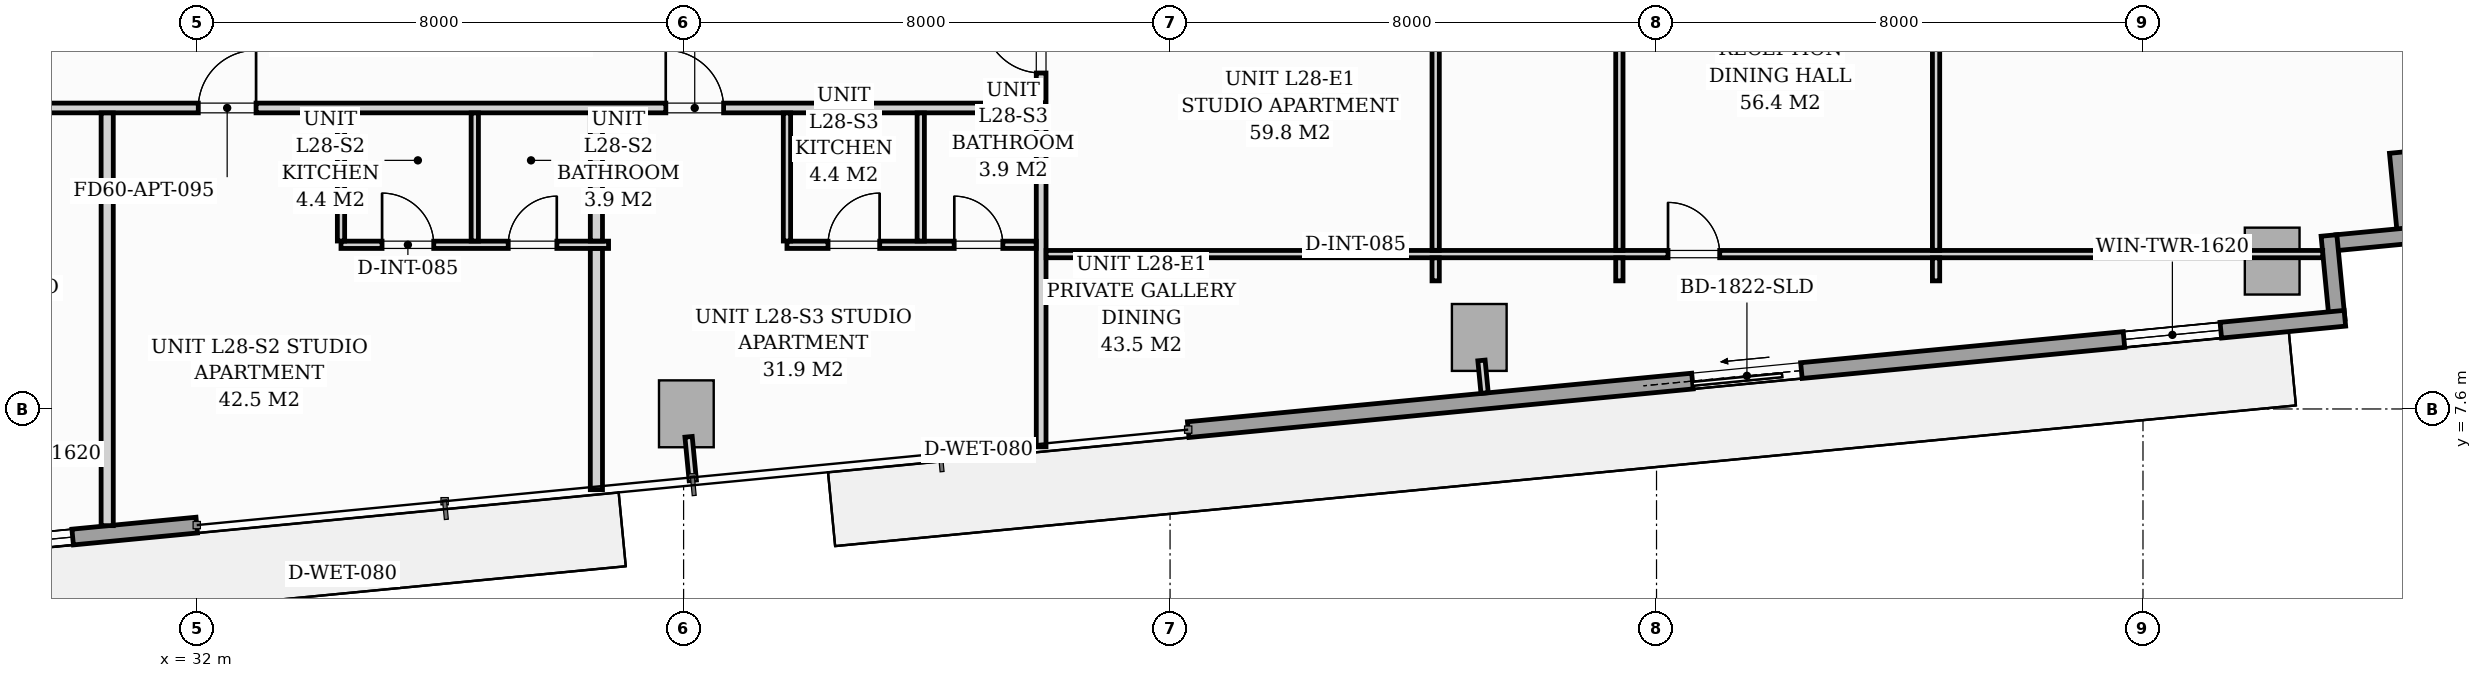
"""IFC4 building model, lengths in metres.
Left out: names, types, materials, properties, quantities, classifications, styles, units other than length and angle.
Written with IfcOpenShell. Run it as: python <this file> out.ifc"""

import sys

from ifc_helpers import new_model, si_unit, direction, frame, frame_2d, origin, origin_2d, place, context, subcontext, project, spatial, rectangle, extrude, source, transform, mapped, element, fill, save


model = new_model("IFC4")
c1 = context("Model", 3, precision=1e-05, world=origin(), true_north=direction((0.0, 1.0)))
c2 = subcontext(c1, "Body", "Model", "MODEL_VIEW")
j1 = project(units=[si_unit("LENGTHUNIT", "METRE"), si_unit("PLANEANGLEUNIT", "RADIAN")], contexts=[c1])
p1 = place(None, origin())
s1 = spatial("IfcSite", under=j1, at=p1, CompositionType="ELEMENT")
p2 = place(p1, origin())
s2 = spatial("IfcBuilding", under=s1, at=p2, CompositionType="ELEMENT")
p3 = place(p2, frame((0.0, 0.0, 100.2)))
s3 = spatial("IfcBuildingStorey", under=s2, at=p3, CompositionType="ELEMENT", Elevation=100.2)
m1 = source(origin(), c2, "Body", "SweptSolid", [
    extrude(rectangle(XDim=0.9, YDim=1.1, at=origin_2d()), origin(), (0.0, 0.0, 1.0), 3.196),
])
for number, where, z_axis, x_axis in (
    (1, (40.045, 7.521, 0.002), (0.0, 0.0, 1.0), (0.995, 0.096, 0.0)),
    (2, (53.085, 8.776, 0.002), (0.0, 0.0, 1.0), (0.995, 0.096, 0.0)),
    (3, (66.125, 10.032, 0.002), (0.0, 0.0, 1.0), (0.995, 0.096, 0.0)),
):
    element("IfcColumn", number, at=place(p3, frame(where, z_axis=z_axis, x_axis=x_axis)), inside=s3, PredefinedType="COLUMN", context=c2, shape_type="MappedRepresentation", body=[
        mapped(m1, transform((0.0, 0.0, 0.0), scale=1.0)),
    ])
p4 = place(p3, frame((68.183, 11.817, 0.0), z_axis=(0.0, 0.0, 1.0), x_axis=(0.095915846097, -0.995389446633, 0.0)))
e4 = element("IfcWall", 4, at=p4, inside=s3, PredefinedType="STANDARD", context=c2, shape_type="SweptSolid", body=[
    extrude(rectangle(XDim=1.395, YDim=0.26, at=frame_2d((0.697, 0.0))), origin(), (0.0, 0.0, 1.0), 2.94),
])
p5 = place(p3, frame((68.574, 10.469, 0.0), z_axis=(0.0, 0.0, 1.0), x_axis=(-0.99540774648, -0.095725744959, 0.0)))
e5 = element("IfcWall", 5, at=p5, inside=s3, PredefinedType="STANDARD", context=c2, shape_type="SweptSolid", body=[
    extrude(rectangle(XDim=1.395, YDim=0.26, at=frame_2d((0.698, 0.0))), origin(), (0.0, 0.0, 1.0), 2.94),
])
p6 = place(p3, frame((67.059, 10.453, 0.0), z_axis=(0.0, 0.0, 1.0), x_axis=(0.095915846097, -0.995389446633, 0.0)))
e6 = element("IfcWall", 6, at=p6, inside=s3, PredefinedType="STANDARD", context=c2, shape_type="SweptSolid", body=[
    extrude(rectangle(XDim=1.395, YDim=0.26, at=frame_2d((0.697, 0.0))), origin(), (0.0, 0.0, 1.0), 2.94),
])
p7 = place(p3, frame((67.32, 9.092, 0.0), z_axis=(0.0, 0.0, 1.0), x_axis=(-0.995396521236, -0.095842399342, 0.0)))
e7 = element("IfcWall", 7, at=p7, inside=s3, PredefinedType="STANDARD", context=c2, shape_type="SweptSolid", body=[
    extrude(rectangle(XDim=19.11, YDim=0.26, at=frame_2d((9.555, 0.0))), origin(), (0.0, 0.0, 1.0), 2.94),
])
p8 = place(p7, frame((8.979, 0.0, 0.0)))
e8 = element("IfcOpeningElement", 8, at=p8, cuts=e7, PredefinedType="OPENING", context=c2, shape_type="SweptSolid", body=[
    extrude(rectangle(XDim=1.8, YDim=2.06, at=frame_2d((0.9, 1.03))), frame((0.0, 0.14, 0.0), z_axis=(0.0, -1.0, 0.0), x_axis=(1.0, 0.0, 0.0)), (0.0, 0.0, 1.0), 0.28),
])
p9 = place(p7, frame((2.05, 0.0, 0.65)))
e9 = element("IfcOpeningElement", 9, at=p9, cuts=e7, PredefinedType="OPENING", context=c2, shape_type="SweptSolid", body=[
    extrude(rectangle(XDim=1.6, YDim=1.5, at=frame_2d((0.8, 0.75))), frame((0.0, 0.14, 0.0), z_axis=(0.0, -1.0, 0.0), x_axis=(1.0, 0.0, 0.0)), (0.0, 0.0, 1.0), 0.28),
])
p10 = place(p3, frame((31.994, 5.69, 0.0), z_axis=(0.0, 0.0, 1.0), x_axis=(-0.995396521236, -0.095842399342, 0.0)))
e10 = element("IfcWall", 10, at=p10, inside=s3, PredefinedType="STANDARD", context=c2, shape_type="SweptSolid", body=[
    extrude(rectangle(XDim=19.11, YDim=0.26, at=frame_2d((9.555, 0.0))), origin(), (0.0, 0.0, 1.0), 2.94),
])
p11 = place(p10, frame((8.19, 0.0, 0.0)))
e11 = element("IfcOpeningElement", 11, at=p11, cuts=e10, PredefinedType="OPENING", context=c2, shape_type="SweptSolid", body=[
    extrude(rectangle(XDim=1.8, YDim=2.06, at=frame_2d((0.9, 1.03))), frame((0.0, 0.14, 0.0), z_axis=(0.0, -1.0, 0.0), x_axis=(1.0, 0.0, 0.0)), (0.0, 0.0, 1.0), 0.28),
])
p12 = place(p10, frame((2.05, 0.0, 0.65)))
e12 = element("IfcOpeningElement", 12, at=p12, cuts=e10, PredefinedType="OPENING", context=c2, shape_type="SweptSolid", body=[
    extrude(rectangle(XDim=1.6, YDim=1.5, at=frame_2d((0.8, 0.75))), frame((0.0, 0.14, 0.0), z_axis=(0.0, -1.0, 0.0), x_axis=(1.0, 0.0, 0.0)), (0.0, 0.0, 1.0), 0.28),
])
p13 = place(p3, frame((21.5, 12.55, 0.0), z_axis=(0.0, 0.0, 1.0), x_axis=(1.0, 0.0, 0.0)))
e13 = element("IfcWall", 13, at=p13, inside=s3, PredefinedType="PARTITIONING", context=c2, shape_type="SweptSolid", body=[
    extrude(rectangle(XDim=24.38, YDim=0.16, at=frame_2d((12.19, 0.0))), origin(), (0.0, 0.0, 1.0), 2.94),
])
p14 = place(p13, frame((6.075, 0.0, 0.0)))
e14 = element("IfcOpeningElement", 14, at=p14, cuts=e13, PredefinedType="OPENING", context=c2, shape_type="SweptSolid", body=[
    extrude(rectangle(XDim=0.95, YDim=2.06, at=frame_2d((0.475, 1.03))), frame((0.0, 0.09, 0.0), z_axis=(0.0, -1.0, 0.0), x_axis=(1.0, 0.0, 0.0)), (0.0, 0.0, 1.0), 0.18),
])
p15 = place(p13, frame((10.519, 0.0, 0.0)))
e15 = element("IfcOpeningElement", 15, at=p15, cuts=e13, PredefinedType="OPENING", context=c2, shape_type="SweptSolid", body=[
    extrude(rectangle(XDim=0.95, YDim=2.06, at=frame_2d((0.475, 1.03))), frame((0.0, 0.09, 0.0), z_axis=(0.0, -1.0, 0.0), x_axis=(1.0, 0.0, 0.0)), (0.0, 0.0, 1.0), 0.18),
])
p16 = place(p13, frame((18.208, 0.0, 0.0)))
e16 = element("IfcOpeningElement", 16, at=p16, cuts=e13, PredefinedType="OPENING", context=c2, shape_type="SweptSolid", body=[
    extrude(rectangle(XDim=0.95, YDim=2.06, at=frame_2d((0.475, 1.03))), frame((0.0, 0.09, 0.0), z_axis=(0.0, -1.0, 0.0), x_axis=(1.0, 0.0, 0.0)), (0.0, 0.0, 1.0), 0.18),
])
p17 = place(p3, frame((45.88, 6.977, 0.0), z_axis=(0.0, 0.0, 1.0), x_axis=(0.0, 1.0, 0.0)))
e17 = element("IfcWall", 17, at=p17, inside=s3, PredefinedType="PARTITIONING", context=c2, shape_type="SweptSolid", body=[
    extrude(rectangle(XDim=5.491, YDim=0.16, at=frame_2d((2.745, 0.0))), origin(), (0.0, 0.0, 1.0), 2.94),
])
p18 = place(p3, frame((45.88, 12.632, 0.0), z_axis=(0.0, 0.0, 1.0), x_axis=(0.0, 1.0, 0.0)))
e18 = element("IfcWall", 18, at=p18, inside=s3, PredefinedType="PARTITIONING", context=c2, shape_type="SweptSolid", body=[
    extrude(rectangle(XDim=4.466, YDim=0.16, at=frame_2d((2.233, 0.0))), origin(), (0.0, 0.0, 1.0), 2.94),
])
p19 = place(p18, frame((0.493, 0.0, 0.0)))
e19 = element("IfcOpeningElement", 19, at=p19, cuts=e18, PredefinedType="OPENING", context=c2, shape_type="SweptSolid", body=[
    extrude(rectangle(XDim=0.95, YDim=2.06, at=frame_2d((0.475, 1.03))), frame((0.0, 0.09, 0.0), z_axis=(0.0, -1.0, 0.0), x_axis=(1.0, 0.0, 0.0)), (0.0, 0.0, 1.0), 0.18),
])
p20 = place(p3, frame((30.521, 5.681, 0.0), z_axis=(0.0, 0.0, 1.0), x_axis=(0.0, 1.0, 0.0)))
e20 = element("IfcWall", 20, at=p20, inside=s3, PredefinedType="PARTITIONING", context=c2, shape_type="SweptSolid", body=[
    extrude(rectangle(XDim=6.787, YDim=0.2, at=frame_2d((3.394, 0.0))), origin(), (0.0, 0.0, 1.0), 2.94),
])
p21 = place(p3, frame((34.366, 10.3, 0.0), z_axis=(0.0, 0.0, 1.0), x_axis=(1.0, 0.0, 0.0)))
e21 = element("IfcWall", 21, at=p21, inside=s3, PredefinedType="PARTITIONING", context=c2, shape_type="SweptSolid", body=[
    extrude(rectangle(XDim=4.4, YDim=0.12, at=frame_2d((2.2, 0.0))), origin(), (0.0, 0.0, 1.0), 2.94),
])
p22 = place(p21, frame((0.675, 0.0, 0.0)))
e22 = element("IfcOpeningElement", 22, at=p22, cuts=e21, PredefinedType="OPENING", context=c2, shape_type="SweptSolid", body=[
    extrude(rectangle(XDim=0.85, YDim=2.05, at=frame_2d((0.425, 1.025))), frame((0.0, 0.07, 0.0), z_axis=(0.0, -1.0, 0.0), x_axis=(1.0, 0.0, 0.0)), (0.0, 0.0, 1.0), 0.14),
])
p23 = place(p21, frame((2.75, 0.0, 0.0)))
e23 = element("IfcOpeningElement", 23, at=p23, cuts=e21, PredefinedType="OPENING", context=c2, shape_type="SweptSolid", body=[
    extrude(rectangle(XDim=0.8, YDim=2.02, at=frame_2d((0.4, 1.01))), frame((0.0, 0.07, 0.0), z_axis=(0.0, -1.0, 0.0), x_axis=(1.0, 0.0, 0.0)), (0.0, 0.0, 1.0), 0.14),
])
for number, where, z_axis, x_axis in (
    (24, (34.366, 10.362, 0.0), (0.0, 0.0, 1.0), (0.0, 1.0, 0.0)),
    (25, (36.566, 10.362, 0.0), (0.0, 0.0, 1.0), (0.0, 1.0, 0.0)),
):
    element("IfcWall", number, at=place(p3, frame(where, z_axis=z_axis, x_axis=x_axis)), inside=s3, PredefinedType="PARTITIONING", context=c2, shape_type="SweptSolid", body=[
        extrude(rectangle(XDim=2.106, YDim=0.12, at=frame_2d((1.053, 0.0))), origin(), (0.0, 0.0, 1.0), 2.94),
    ])
p24 = place(p3, frame((38.566, 6.273, 0.0), z_axis=(0.0, 0.0, 1.0), x_axis=(0.0, 1.0, 0.0)))
e26 = element("IfcWall", 26, at=p24, inside=s3, PredefinedType="PARTITIONING", context=c2, shape_type="SweptSolid", body=[
    extrude(rectangle(XDim=3.965, YDim=0.2, at=frame_2d((1.982, 0.0))), origin(), (0.0, 0.0, 1.0), 2.94),
])
p25 = place(p3, frame((38.566, 10.362, 0.0), z_axis=(0.0, 0.0, 1.0), x_axis=(0.0, 1.0, 0.0)))
e27 = element("IfcWall", 27, at=p25, inside=s3, PredefinedType="PARTITIONING", context=c2, shape_type="SweptSolid", body=[
    extrude(rectangle(XDim=2.106, YDim=0.2, at=frame_2d((1.053, 0.0))), origin(), (0.0, 0.0, 1.0), 2.94),
])
p26 = place(p3, frame((41.7, 10.3, 0.0), z_axis=(0.0, 0.0, 1.0), x_axis=(1.0, 0.0, 0.0)))
e28 = element("IfcWall", 28, at=p26, inside=s3, PredefinedType="PARTITIONING", context=c2, shape_type="SweptSolid", body=[
    extrude(rectangle(XDim=4.098, YDim=0.12, at=frame_2d((2.049, 0.0))), origin(), (0.0, 0.0, 1.0), 2.94),
])
p27 = place(p26, frame((0.675, 0.0, 0.0)))
e29 = element("IfcOpeningElement", 29, at=p27, cuts=e28, PredefinedType="OPENING", context=c2, shape_type="SweptSolid", body=[
    extrude(rectangle(XDim=0.85, YDim=2.05, at=frame_2d((0.425, 1.025))), frame((0.0, 0.07, 0.0), z_axis=(0.0, -1.0, 0.0), x_axis=(1.0, 0.0, 0.0)), (0.0, 0.0, 1.0), 0.14),
])
p28 = place(p26, frame((2.75, 0.0, 0.0)))
e30 = element("IfcOpeningElement", 30, at=p28, cuts=e28, PredefinedType="OPENING", context=c2, shape_type="SweptSolid", body=[
    extrude(rectangle(XDim=0.8, YDim=2.02, at=frame_2d((0.4, 1.01))), frame((0.0, 0.07, 0.0), z_axis=(0.0, -1.0, 0.0), x_axis=(1.0, 0.0, 0.0)), (0.0, 0.0, 1.0), 0.14),
])
for number, where, z_axis, x_axis in (
    (31, (41.7, 10.362, 0.0), (0.0, 0.0, 1.0), (0.0, 1.0, 0.0)),
    (32, (43.9, 10.362, 0.0), (0.0, 0.0, 1.0), (0.0, 1.0, 0.0)),
):
    element("IfcWall", number, at=place(p3, frame(where, z_axis=z_axis, x_axis=x_axis)), inside=s3, PredefinedType="PARTITIONING", context=c2, shape_type="SweptSolid", body=[
        extrude(rectangle(XDim=2.106, YDim=0.12, at=frame_2d((1.053, 0.0))), origin(), (0.0, 0.0, 1.0), 2.94),
    ])
p29 = place(p3, frame((45.962, 10.147, 0.0), z_axis=(0.0, 0.0, 1.0), x_axis=(1.0, 0.0, 0.0)))
e33 = element("IfcWall", 33, at=p29, inside=s3, PredefinedType="PARTITIONING", context=c2, shape_type="SweptSolid", body=[
    extrude(rectangle(XDim=20.994, YDim=0.12, at=frame_2d((10.497, 0.0))), origin(), (0.0, 0.0, 1.0), 2.31),
])
p30 = place(p29, frame((10.227, 0.0, 0.0)))
e34 = element("IfcOpeningElement", 34, at=p30, cuts=e33, PredefinedType="OPENING", context=c2, shape_type="SweptSolid", body=[
    extrude(rectangle(XDim=0.85, YDim=2.05, at=frame_2d((0.425, 1.025))), frame((0.0, 0.07, 0.0), z_axis=(0.0, -1.0, 0.0), x_axis=(1.0, 0.0, 0.0)), (0.0, 0.0, 1.0), 0.14),
])
p31 = place(p3, frame((60.597, 9.707, 0.0), z_axis=(0.0, 0.0, 1.0), x_axis=(0.0, 1.0, 0.0)))
e35 = element("IfcWall", 35, at=p31, inside=s3, PredefinedType="PARTITIONING", context=c2, shape_type="SweptSolid", body=[
    extrude(rectangle(XDim=0.378, YDim=0.12, at=frame_2d((0.189, 0.0))), origin(), (0.0, 0.0, 1.0), 2.94),
])
p32 = place(p3, frame((60.597, 10.209, 0.0), z_axis=(0.0, 0.0, 1.0), x_axis=(0.0, 1.0, 0.0)))
e36 = element("IfcWall", 36, at=p32, inside=s3, PredefinedType="PARTITIONING", context=c2, shape_type="SweptSolid", body=[
    extrude(rectangle(XDim=11.087, YDim=0.12, at=frame_2d((5.543, 0.0))), origin(), (0.0, 0.0, 1.0), 2.94),
])
p33 = place(p32, frame((5.118, 0.0, 0.0)))
e37 = element("IfcOpeningElement", 37, at=p33, cuts=e36, PredefinedType="OPENING", context=c2, shape_type="SweptSolid", body=[
    extrude(rectangle(XDim=0.85, YDim=2.05, at=frame_2d((0.425, 1.025))), frame((0.0, 0.07, 0.0), z_axis=(0.0, -1.0, 0.0), x_axis=(1.0, 0.0, 0.0)), (0.0, 0.0, 1.0), 0.14),
])
p34 = place(p3, frame((55.389, 9.707, 0.0), z_axis=(0.0, 0.0, 1.0), x_axis=(0.0, 1.0, 0.0)))
e38 = element("IfcWall", 38, at=p34, inside=s3, PredefinedType="PARTITIONING", context=c2, shape_type="SweptSolid", body=[
    extrude(rectangle(XDim=0.378, YDim=0.12, at=frame_2d((0.189, 0.0))), origin(), (0.0, 0.0, 1.0), 2.94),
])
p35 = place(p3, frame((55.389, 10.209, 0.0), z_axis=(0.0, 0.0, 1.0), x_axis=(0.0, 1.0, 0.0)))
e39 = element("IfcWall", 39, at=p35, inside=s3, PredefinedType="PARTITIONING", context=c2, shape_type="SweptSolid", body=[
    extrude(rectangle(XDim=11.087, YDim=0.12, at=frame_2d((5.543, 0.0))), origin(), (0.0, 0.0, 1.0), 2.94),
])
p36 = place(p35, frame((5.118, 0.0, 0.0)))
e40 = element("IfcOpeningElement", 40, at=p36, cuts=e39, PredefinedType="OPENING", context=c2, shape_type="SweptSolid", body=[
    extrude(rectangle(XDim=0.85, YDim=2.05, at=frame_2d((0.425, 1.025))), frame((0.0, 0.07, 0.0), z_axis=(0.0, -1.0, 0.0), x_axis=(1.0, 0.0, 0.0)), (0.0, 0.0, 1.0), 0.14),
])
p37 = place(p3, frame((52.368, 9.707, 0.0), z_axis=(0.0, 0.0, 1.0), x_axis=(0.0, 1.0, 0.0)))
e41 = element("IfcWall", 41, at=p37, inside=s3, PredefinedType="PARTITIONING", context=c2, shape_type="SweptSolid", body=[
    extrude(rectangle(XDim=0.378, YDim=0.12, at=frame_2d((0.189, 0.0))), origin(), (0.0, 0.0, 1.0), 2.94),
])
p38 = place(p3, frame((52.368, 10.209, 0.0), z_axis=(0.0, 0.0, 1.0), x_axis=(0.0, 1.0, 0.0)))
e42 = element("IfcWall", 42, at=p38, inside=s3, PredefinedType="PARTITIONING", context=c2, shape_type="SweptSolid", body=[
    extrude(rectangle(XDim=11.087, YDim=0.12, at=frame_2d((5.543, 0.0))), origin(), (0.0, 0.0, 1.0), 2.94),
])
p39 = place(p38, frame((5.118, 0.0, 0.0)))
e43 = element("IfcOpeningElement", 43, at=p39, cuts=e42, PredefinedType="OPENING", context=c2, shape_type="SweptSolid", body=[
    extrude(rectangle(XDim=0.85, YDim=2.05, at=frame_2d((0.425, 1.025))), frame((0.0, 0.07, 0.0), z_axis=(0.0, -1.0, 0.0), x_axis=(1.0, 0.0, 0.0)), (0.0, 0.0, 1.0), 0.14),
])
p40 = place(p3, frame((40.082, 7.142, 0.0), z_axis=(0.0, 0.0, 1.0), x_axis=(0.095944965663, -0.995386640238, 0.0)))
e44 = element("IfcWall", 44, at=p40, inside=s3, PredefinedType="PARTITIONING", context=c2, shape_type="SweptSolid", body=[
    extrude(rectangle(XDim=0.72, YDim=0.12, at=frame_2d((0.36, 0.0))), origin(), (0.0, 0.0, 1.0), 2.94),
])
p41 = place(p3, frame((53.121, 8.398, 0.0), z_axis=(0.0, 0.0, 1.0), x_axis=(0.096179204763, -0.995364034196, 0.0)))
e45 = element("IfcWall", 45, at=p41, inside=s3, PredefinedType="PARTITIONING", context=c2, shape_type="SweptSolid", body=[
    extrude(rectangle(XDim=0.538, YDim=0.12, at=frame_2d((0.269, 0.0))), origin(), (0.0, 0.0, 1.0), 2.94),
])
m2 = source(origin(), c2, "Body", "SweptSolid", [
    extrude(rectangle(XDim=1.6, YDim=1.5, at=frame_2d((0.8, 0.75))), frame((0.0, 0.03, 0.0), z_axis=(0.0, -1.0, 0.0), x_axis=(1.0, 0.0, 0.0)), (0.0, 0.0, 1.0), 0.06),
])
p42 = place(p12, origin())
e46 = element("IfcWindow", 46, at=p42, inside=s3, PartitioningType="SINGLE_PANEL", PredefinedType="WINDOW", context=c2, shape_type="MappedRepresentation", body=[
    mapped(m2, transform((0.0, 0.0, 0.0), scale=1.0)),
])
fill(e12, e46)
m3 = source(origin(), c2, "Body", "SweptSolid", [
    extrude(rectangle(XDim=1.8, YDim=2.06, at=frame_2d((0.9, 1.03))), frame((0.0, 0.025, 0.0), z_axis=(0.0, -1.0, 0.0), x_axis=(1.0, 0.0, 0.0)), (0.0, 0.0, 1.0), 0.05),
])
p43 = place(p8, origin())
e47 = element("IfcDoor", 47, at=p43, inside=s3, OperationType="SLIDING_TO_RIGHT", PredefinedType="DOOR", context=c2, shape_type="MappedRepresentation", body=[
    mapped(m3, transform((0.0, 0.0, 0.0), scale=1.0)),
])
fill(e8, e47)
p44 = place(p9, origin())
e48 = element("IfcWindow", 48, at=p44, inside=s3, PartitioningType="SINGLE_PANEL", PredefinedType="WINDOW", context=c2, shape_type="MappedRepresentation", body=[
    mapped(m2, transform((0.0, 0.0, 0.0), scale=1.0)),
])
fill(e9, e48)
m4 = source(origin(), c2, "Body", "SweptSolid", [
    extrude(rectangle(XDim=0.95, YDim=2.06, at=frame_2d((0.475, 1.03))), frame((0.0, 0.025, 0.0), z_axis=(0.0, -1.0, 0.0), x_axis=(1.0, 0.0, 0.0)), (0.0, 0.0, 1.0), 0.05),
])
p45 = place(p15, origin())
e49 = element("IfcDoor", 49, at=p45, inside=s3, OperationType="SINGLE_SWING_RIGHT", PredefinedType="DOOR", context=c2, shape_type="MappedRepresentation", body=[
    mapped(m4, transform((0.0, 0.0, 0.0), scale=1.0)),
])
fill(e15, e49)
m5 = source(origin(), c2, "Body", "SweptSolid", [
    extrude(rectangle(XDim=0.85, YDim=2.05, at=frame_2d((0.425, 1.025))), frame((0.0, 0.025, 0.0), z_axis=(0.0, -1.0, 0.0), x_axis=(1.0, 0.0, 0.0)), (0.0, 0.0, 1.0), 0.05),
])
p46 = place(p22, origin())
e50 = element("IfcDoor", 50, at=p46, inside=s3, OperationType="SINGLE_SWING_LEFT", PredefinedType="DOOR", context=c2, shape_type="MappedRepresentation", body=[
    mapped(m5, transform((0.0, 0.0, 0.0), scale=1.0)),
])
fill(e22, e50)
m6 = source(origin(), c2, "Body", "SweptSolid", [
    extrude(rectangle(XDim=0.8, YDim=2.02, at=frame_2d((0.4, 1.01))), frame((0.0, 0.025, 0.0), z_axis=(0.0, -1.0, 0.0), x_axis=(1.0, 0.0, 0.0)), (0.0, 0.0, 1.0), 0.05),
])
p47 = place(p23, origin())
e51 = element("IfcDoor", 51, at=p47, inside=s3, OperationType="SINGLE_SWING_RIGHT", PredefinedType="DOOR", context=c2, shape_type="MappedRepresentation", body=[
    mapped(m6, transform((0.0, 0.0, 0.0), scale=1.0)),
])
fill(e23, e51)
p48 = place(p16, origin())
e52 = element("IfcDoor", 52, at=p48, inside=s3, OperationType="SINGLE_SWING_LEFT", PredefinedType="DOOR", context=c2, shape_type="MappedRepresentation", body=[
    mapped(m4, transform((0.0, 0.0, 0.0), scale=1.0)),
])
fill(e16, e52)
p49 = place(p27, origin())
e53 = element("IfcDoor", 53, at=p49, inside=s3, OperationType="SINGLE_SWING_RIGHT", PredefinedType="DOOR", context=c2, shape_type="MappedRepresentation", body=[
    mapped(m5, transform((0.0, 0.0, 0.0), scale=1.0)),
])
fill(e29, e53)
p50 = place(p28, origin())
e54 = element("IfcDoor", 54, at=p50, inside=s3, OperationType="SINGLE_SWING_LEFT", PredefinedType="DOOR", context=c2, shape_type="MappedRepresentation", body=[
    mapped(m6, transform((0.0, 0.0, 0.0), scale=1.0)),
])
fill(e30, e54)
p51 = place(p19, origin())
e55 = element("IfcDoor", 55, at=p51, inside=s3, OperationType="SINGLE_SWING_RIGHT", PredefinedType="DOOR", context=c2, shape_type="MappedRepresentation", body=[
    mapped(m4, transform((0.0, 0.0, 0.0), scale=1.0)),
])
fill(e19, e55)
p52 = place(p30, origin())
e56 = element("IfcDoor", 56, at=p52, inside=s3, OperationType="SINGLE_SWING_LEFT", PredefinedType="DOOR", context=c2, shape_type="MappedRepresentation", body=[
    mapped(m5, transform((0.0, 0.0, 0.0), scale=1.0)),
])
fill(e34, e56)
save(model, sys.argv[1])
